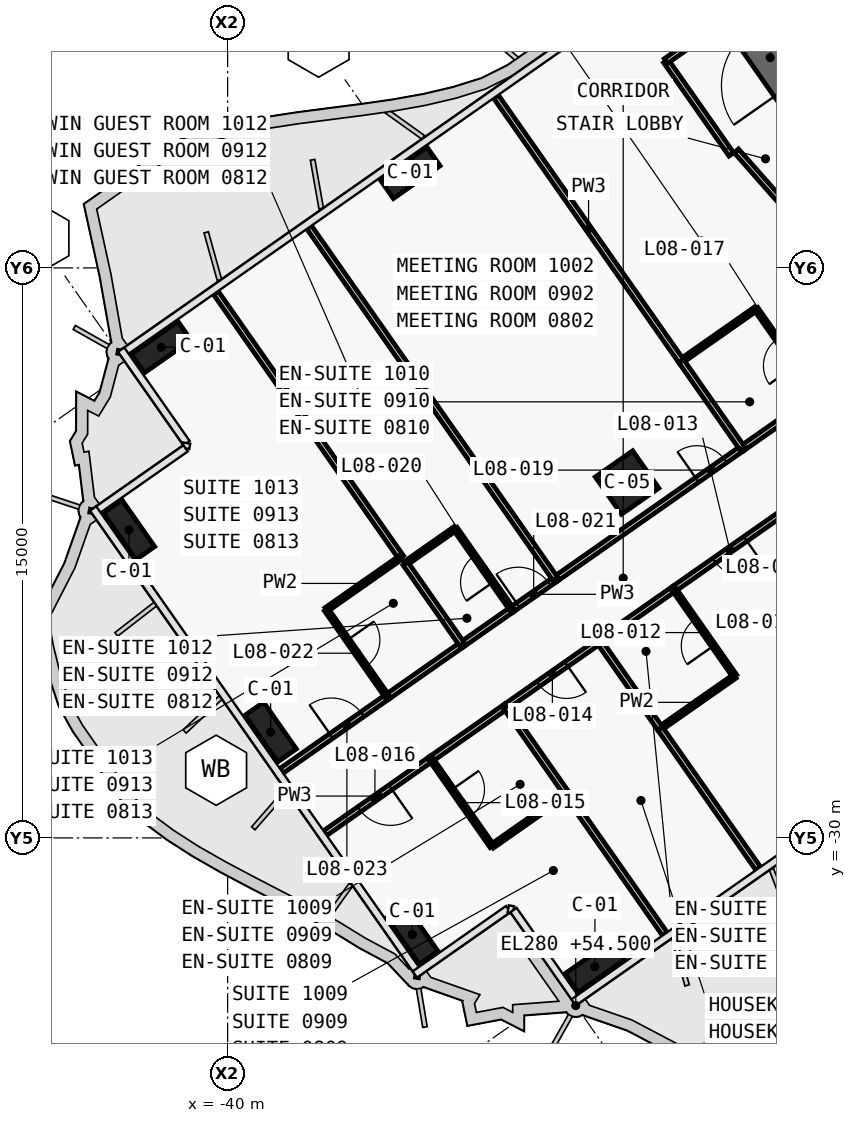
"""IFC4 building model, lengths in metres.
Left out: names, types, materials, properties, quantities, classifications, styles, units other than length and angle.
Written with IfcOpenShell. Run it as: python <this file> out.ifc"""

import sys

from ifc_helpers import new_model, si_unit, direction, frame, frame_2d, origin, origin_2d, place, context, subcontext, project, spatial, polyline, rectangle, outline, extrude, element, fill, save


model = new_model("IFC4")
c1 = context("Model", 3, precision=1e-05, world=origin(), true_north=direction((0.0, 1.0)))
c2 = subcontext(c1, "Body", "Model", "MODEL_VIEW")
j1 = project(units=[si_unit("LENGTHUNIT", "METRE"), si_unit("PLANEANGLEUNIT", "RADIAN")], contexts=[c1])
p1 = place(None, origin())
s1 = spatial("IfcSite", under=j1, at=p1, CompositionType="ELEMENT")
p2 = place(p1, origin())
s2 = spatial("IfcBuilding", under=s1, at=p2, CompositionType="ELEMENT")
p3 = place(p2, frame((0.0, 0.0, 54.5)))
s3 = spatial("IfcBuildingStorey", under=s2, at=p3, CompositionType="ELEMENT", Elevation=54.5)
p4 = place(p3, frame((-21.708, -15.2, 0.0), z_axis=(0.0, 0.0, 1.0), x_axis=(-0.573576324356, 0.819152122709, 0.0)))
e1 = element("IfcWall", 1, at=p4, inside=s3, PredefinedType="SHEAR", context=c2, shape_type="SweptSolid", body=[
    extrude(outline(polyline([(0.0, 0.5), (0.0, -0.5), (9.2, -0.5), (9.2, 0.5), (0.0, 0.5)])), origin(), (0.0, 0.0, 1.0), 3.6),
])
p5 = place(p4, frame((6.1, 0.0, 0.0)))
e2 = element("IfcOpeningElement", 2, at=p5, cuts=e1, PredefinedType="OPENING", context=c2, shape_type="SweptSolid", body=[
    extrude(rectangle(XDim=1.8, YDim=2.1, at=frame_2d((0.9, 1.05))), frame((0.0, 0.51, 0.0), z_axis=(0.0, -1.0, 0.0), x_axis=(1.0, 0.0, 0.0)), (0.0, 0.0, 1.0), 1.02),
])
p6 = place(p4, frame((1.9, 0.0, 0.0)))
e3 = element("IfcOpeningElement", 3, at=p6, cuts=e1, PredefinedType="OPENING", context=c2, shape_type="SweptSolid", body=[
    extrude(rectangle(XDim=1.8, YDim=2.1, at=frame_2d((0.9, 1.05))), frame((0.0, 0.51, 0.0), z_axis=(0.0, -1.0, 0.0), x_axis=(1.0, 0.0, 0.0)), (0.0, 0.0, 1.0), 1.02),
])
for number, where, z_axis, x_axis in (
    (4, (-30.336, -33.388, 0.0), (0.0, 0.0, 1.0), (-0.819, -0.574, 0.0)),
    (5, (-35.197, -12.498, 0.0), (0.0, 0.0, 1.0), (-0.819, -0.574, 0.0)),
    (6, (-41.75, -17.087, 0.0), (0.0, 0.0, 1.0), (-0.819, -0.574, 0.0)),
    (7, (-35.14, -32.541, 0.0), (0.0, 0.0, 1.0), (-0.574, 0.819, 0.0)),
    (8, (-38.869, -27.216, 0.0), (0.0, 0.0, 1.0), (-0.574, 0.819, 0.0)),
    (9, (-42.597, -21.892, 0.0), (0.0, 0.0, 1.0), (-0.574, 0.819, 0.0)),
):
    element("IfcColumn", number, at=place(p3, frame(where, z_axis=z_axis, x_axis=x_axis)), inside=s3, PredefinedType="COLUMN", context=c2, shape_type="SweptSolid", body=[
        extrude(rectangle(XDim=1.5, YDim=0.6, at=origin_2d()), origin(), (0.0, 0.0, 1.0), 3.6),
    ])
p7 = place(p3, frame((-29.49, -20.649, 0.0), z_axis=(0.0, 0.0, 1.0), x_axis=(-0.819152044289, -0.573576436351, 0.0)))
e10 = element("IfcColumn", 10, at=p7, inside=s3, PredefinedType="COLUMN", context=c2, shape_type="SweptSolid", body=[
    extrude(rectangle(XDim=1.2, YDim=1.2, at=origin_2d()), origin(), (0.0, 0.0, 1.0), 3.6),
])
p8 = place(p3, frame((-26.46, -19.748, 0.0), z_axis=(0.0, 0.0, 1.0), x_axis=(0.819179439794, 0.573537309527, 0.0)))
e11 = element("IfcWall", 11, at=p8, inside=s3, PredefinedType="PARTITIONING", context=c2, shape_type="SweptSolid", body=[
    extrude(rectangle(XDim=2.404, YDim=0.15, at=frame_2d((1.202, 0.0))), origin(), (0.0, 0.0, 1.0), 3.32),
])
p9 = place(p3, frame((-31.375, -23.19, 0.0), z_axis=(0.0, 0.0, 1.0), x_axis=(0.819165052243, 0.573557858619, 0.0)))
e12 = element("IfcWall", 12, at=p9, inside=s3, PredefinedType="PARTITIONING", context=c2, shape_type="SweptSolid", body=[
    extrude(rectangle(XDim=6.004, YDim=0.15, at=frame_2d((3.002, 0.0))), origin(), (0.0, 0.0, 1.0), 2.6),
])
p10 = place(p9, frame((4.552, 0.0, 0.0)))
e13 = element("IfcOpeningElement", 13, at=p10, cuts=e12, PredefinedType="OPENING", context=c2, shape_type="SweptSolid", body=[
    extrude(rectangle(XDim=0.9, YDim=2.1, at=frame_2d((0.45, 1.05))), frame((0.0, 0.085, 0.0), z_axis=(0.0, -1.0, 0.0), x_axis=(1.0, 0.0, 0.0)), (0.0, 0.0, 1.0), 0.17),
])
p11 = place(p3, frame((-32.521, -23.992, 0.0), z_axis=(0.0, 0.0, 1.0), x_axis=(0.819199220913, 0.573509055252, 0.0)))
e14 = element("IfcWall", 14, at=p11, inside=s3, PredefinedType="PARTITIONING", context=c2, shape_type="SweptSolid", body=[
    extrude(rectangle(XDim=1.403, YDim=0.15, at=frame_2d((0.702, 0.0))), origin(), (0.0, 0.0, 1.0), 3.32),
])
p12 = place(p11, frame((0.201, 0.0, 0.0)))
e15 = element("IfcOpeningElement", 15, at=p12, cuts=e14, PredefinedType="OPENING", context=c2, shape_type="SweptSolid", body=[
    extrude(rectangle(XDim=1.0, YDim=2.1, at=frame_2d((0.5, 1.05))), frame((0.0, 0.085, 0.0), z_axis=(0.0, -1.0, 0.0), x_axis=(1.0, 0.0, 0.0)), (0.0, 0.0, 1.0), 0.17),
])
p13 = place(p3, frame((-33.833, -24.91, 0.0), z_axis=(0.0, 0.0, 1.0), x_axis=(0.819189013667, 0.573523634986, 0.0)))
e16 = element("IfcWall", 16, at=p13, inside=s3, PredefinedType="PARTITIONING", context=c2, shape_type="SweptSolid", body=[
    extrude(rectangle(XDim=1.604, YDim=0.15, at=frame_2d((0.802, 0.0))), origin(), (0.0, 0.0, 1.0), 3.32),
])
p14 = place(p3, frame((-38.582, -28.236, 0.0), z_axis=(0.0, 0.0, 1.0), x_axis=(0.819154345195, 0.573573150303, 0.0)))
e17 = element("IfcWall", 17, at=p14, inside=s3, PredefinedType="PARTITIONING", context=c2, shape_type="SweptSolid", body=[
    extrude(rectangle(XDim=3.401, YDim=0.15, at=frame_2d((1.7, 0.0))), origin(), (0.0, 0.0, 1.0), 2.5),
])
p15 = place(p14, frame((1.6, 0.0, 0.0)))
e18 = element("IfcOpeningElement", 18, at=p15, cuts=e17, PredefinedType="OPENING", context=c2, shape_type="SweptSolid", body=[
    extrude(rectangle(XDim=1.0, YDim=2.1, at=frame_2d((0.5, 1.05))), frame((0.0, 0.085, 0.0), z_axis=(0.0, -1.0, 0.0), x_axis=(1.0, 0.0, 0.0)), (0.0, 0.0, 1.0), 0.17),
])
p16 = place(p3, frame((-35.798, -26.287, 0.0), z_axis=(0.0, 0.0, 1.0), x_axis=(0.819146032251, 0.573585022335, 0.0)))
e19 = element("IfcWall", 19, at=p16, inside=s3, PredefinedType="PARTITIONING", context=c2, shape_type="SweptSolid", body=[
    extrude(rectangle(XDim=2.404, YDim=0.15, at=frame_2d((1.202, 0.0))), origin(), (0.0, 0.0, 1.0), 3.32),
])
p17 = place(p3, frame((-25.31, -21.384, 0.0), z_axis=(0.0, 0.0, 1.0), x_axis=(-0.819145961204, -0.573585123798, 0.0)))
e20 = element("IfcWall", 20, at=p17, inside=s3, PredefinedType="PARTITIONING", context=c2, shape_type="SweptSolid", body=[
    extrude(rectangle(XDim=3.603, YDim=0.15, at=frame_2d((1.802, 0.0))), origin(), (0.0, 0.0, 1.0), 2.6),
])
p18 = place(p17, frame((1.302, 0.0, 0.0)))
e21 = element("IfcOpeningElement", 21, at=p18, cuts=e20, PredefinedType="OPENING", context=c2, shape_type="SweptSolid", body=[
    extrude(rectangle(XDim=1.0, YDim=2.1, at=frame_2d((0.5, 1.05))), frame((0.0, 0.085, 0.0), z_axis=(0.0, -1.0, 0.0), x_axis=(1.0, 0.0, 0.0)), (0.0, 0.0, 1.0), 0.17),
])
p19 = place(p3, frame((-28.259, -23.449, 0.0), z_axis=(0.0, 0.0, 1.0), x_axis=(-0.819146032251, -0.573585022335, 0.0)))
e22 = element("IfcWall", 22, at=p19, inside=s3, PredefinedType="PARTITIONING", context=c2, shape_type="SweptSolid", body=[
    extrude(rectangle(XDim=2.404, YDim=0.15, at=frame_2d((1.202, 0.0))), origin(), (0.0, 0.0, 1.0), 3.32),
])
p20 = place(p3, frame((-30.225, -24.826, 0.0), z_axis=(0.0, 0.0, 1.0), x_axis=(-0.819128818764, -0.573609604409, 0.0)))
e23 = element("IfcWall", 23, at=p20, inside=s3, PredefinedType="PARTITIONING", context=c2, shape_type="SweptSolid", body=[
    extrude(rectangle(XDim=3.004, YDim=0.15, at=frame_2d((1.502, 0.0))), origin(), (0.0, 0.0, 1.0), 3.32),
])
p21 = place(p20, frame((1.052, 0.0, 0.0)))
e24 = element("IfcOpeningElement", 24, at=p21, cuts=e23, PredefinedType="OPENING", context=c2, shape_type="SweptSolid", body=[
    extrude(rectangle(XDim=0.9, YDim=2.1, at=frame_2d((0.45, 1.05))), frame((0.0, 0.085, 0.0), z_axis=(0.0, -1.0, 0.0), x_axis=(1.0, 0.0, 0.0)), (0.0, 0.0, 1.0), 0.17),
])
p22 = place(p3, frame((-34.649, -27.924, 0.0), z_axis=(0.0, 0.0, 1.0), x_axis=(-0.819144234337, -0.573587589957, 0.0)))
e25 = element("IfcWall", 25, at=p22, inside=s3, PredefinedType="PARTITIONING", context=c2, shape_type="SweptSolid", body=[
    extrude(rectangle(XDim=3.401, YDim=0.15, at=frame_2d((1.701, 0.0))), origin(), (0.0, 0.0, 1.0), 2.5),
])
p23 = place(p22, frame((1.301, 0.0, 0.0)))
e26 = element("IfcOpeningElement", 26, at=p23, cuts=e25, PredefinedType="OPENING", context=c2, shape_type="SweptSolid", body=[
    extrude(rectangle(XDim=1.0, YDim=2.1, at=frame_2d((0.5, 1.05))), frame((0.0, 0.085, 0.0), z_axis=(0.0, -1.0, 0.0), x_axis=(1.0, 0.0, 0.0)), (0.0, 0.0, 1.0), 0.17),
])
p24 = place(p3, frame((-32.682, -26.546, 0.0), z_axis=(0.0, 0.0, 1.0), x_axis=(-0.819179439794, -0.573537309527, 0.0)))
e27 = element("IfcWall", 27, at=p24, inside=s3, PredefinedType="PARTITIONING", context=c2, shape_type="SweptSolid", body=[
    extrude(rectangle(XDim=2.404, YDim=0.15, at=frame_2d((1.202, 0.0))), origin(), (0.0, 0.0, 1.0), 3.32),
])
p25 = place(p3, frame((-26.746, -12.014, 0.0), z_axis=(0.0, 0.0, 1.0), x_axis=(-0.573560650686, 0.819163097304, 0.0)))
e28 = element("IfcWall", 28, at=p25, inside=s3, PredefinedType="PARTITIONING", context=c2, shape_type="SweptSolid", body=[
    extrude(rectangle(XDim=3.0, YDim=0.15, at=frame_2d((1.5, 0.0))), origin(), (0.0, 0.0, 1.0), 3.32),
])
p26 = place(p3, frame((-28.467, -9.556, 0.0), z_axis=(0.0, 0.0, 1.0), x_axis=(0.819109000826, 0.573637903879, 0.0)))
e29 = element("IfcWall", 29, at=p26, inside=s3, PredefinedType="PARTITIONING", context=c2, shape_type="SweptSolid", body=[
    extrude(rectangle(XDim=1.68, YDim=0.15, at=frame_2d((0.84, 0.0))), origin(), (0.0, 0.0, 1.0), 3.32),
])
p27 = place(p3, frame((-22.284, -16.827, 0.0), z_axis=(0.0, 0.0, 1.0), x_axis=(-0.661545117561, 0.749905365651, 0.0)))
e30 = element("IfcWall", 30, at=p27, inside=s3, PredefinedType="PARTITIONING", context=c2, shape_type="SweptSolid", body=[
    extrude(rectangle(XDim=6.543, YDim=0.15, at=frame_2d((3.271, 0.0))), origin(), (0.0, 0.0, 1.0), 2.6),
])
p28 = place(p3, frame((-24.492, -18.37, 0.0), z_axis=(0.0, 0.0, 1.0), x_axis=(-0.573550118428, 0.819170471667, 0.0)))
e31 = element("IfcWall", 31, at=p28, inside=s3, PredefinedType="PARTITIONING", context=c2, shape_type="SweptSolid", body=[
    extrude(rectangle(XDim=2.8, YDim=0.12, at=frame_2d((1.4, 0.0))), origin(), (0.0, 0.0, 1.0), 2.6),
])
p29 = place(p28, frame((0.975, 0.0, 0.0)))
e32 = element("IfcOpeningElement", 32, at=p29, cuts=e31, PredefinedType="OPENING", context=c2, shape_type="SweptSolid", body=[
    extrude(rectangle(XDim=0.85, YDim=2.05, at=frame_2d((0.425, 1.025))), frame((0.0, 0.07, 0.0), z_axis=(0.0, -1.0, 0.0), x_axis=(1.0, 0.0, 0.0)), (0.0, 0.0, 1.0), 0.14),
])
p30 = place(p3, frame((-26.099, -16.076, 0.0), z_axis=(0.0, 0.0, 1.0), x_axis=(-0.819155442668, -0.573571582932, 0.0)))
e33 = element("IfcWall", 33, at=p30, inside=s3, PredefinedType="PARTITIONING", context=c2, shape_type="SweptSolid", body=[
    extrude(rectangle(XDim=2.4, YDim=0.12, at=frame_2d((1.2, 0.0))), origin(), (0.0, 0.0, 1.0), 3.32),
])
p31 = place(p3, frame((-28.065, -17.453, 0.0), z_axis=(0.0, 0.0, 1.0), x_axis=(-0.573593433868, 0.819140142237, 0.0)))
e34 = element("IfcWall", 34, at=p31, inside=s3, PredefinedType="PARTITIONING", context=c2, shape_type="SweptSolid", body=[
    extrude(rectangle(XDim=8.499, YDim=0.15, at=frame_2d((4.25, 0.0))), origin(), (0.0, 0.0, 1.0), 2.6),
])
p32 = place(p3, frame((-26.458, -19.747, 0.0), z_axis=(0.0, 0.0, 1.0), x_axis=(-0.573550118428, 0.819170471667, 0.0)))
e35 = element("IfcWall", 35, at=p32, inside=s3, PredefinedType="PARTITIONING", context=c2, shape_type="SweptSolid", body=[
    extrude(rectangle(XDim=2.8, YDim=0.15, at=frame_2d((1.4, 0.0))), origin(), (0.0, 0.0, 1.0), 2.6),
])
p33 = place(p3, frame((-31.373, -23.189, 0.0), z_axis=(0.0, 0.0, 1.0), x_axis=(-0.573571089604, 0.819155788095, 0.0)))
e36 = element("IfcWall", 36, at=p33, inside=s3, PredefinedType="PARTITIONING", context=c2, shape_type="SweptSolid", body=[
    extrude(rectangle(XDim=11.3, YDim=0.15, at=frame_2d((5.65, 0.0))), origin(), (0.0, 0.0, 1.0), 2.5),
])
p34 = place(p3, frame((-32.519, -23.991, 0.0), z_axis=(0.0, 0.0, 1.0), x_axis=(-0.573537965655, 0.819178980414, 0.0)))
e37 = element("IfcWall", 37, at=p34, inside=s3, PredefinedType="PARTITIONING", context=c2, shape_type="SweptSolid", body=[
    extrude(rectangle(XDim=2.6, YDim=0.12, at=frame_2d((1.3, 0.0))), origin(), (0.0, 0.0, 1.0), 2.6),
])
p35 = place(p34, frame((0.875, 0.0, 0.0)))
e38 = element("IfcOpeningElement", 38, at=p35, cuts=e37, PredefinedType="OPENING", context=c2, shape_type="SweptSolid", body=[
    extrude(rectangle(XDim=0.85, YDim=2.05, at=frame_2d((0.425, 1.025))), frame((0.0, 0.07, 0.0), z_axis=(0.0, -1.0, 0.0), x_axis=(1.0, 0.0, 0.0)), (0.0, 0.0, 1.0), 0.14),
])
p36 = place(p3, frame((-34.012, -21.861, 0.0), z_axis=(0.0, 0.0, 1.0), x_axis=(-0.81918174131, -0.573534022273, 0.0)))
e39 = element("IfcWall", 39, at=p36, inside=s3, PredefinedType="PARTITIONING", context=c2, shape_type="SweptSolid", body=[
    extrude(rectangle(XDim=1.6, YDim=0.12, at=frame_2d((0.8, 0.0))), origin(), (0.0, 0.0, 1.0), 3.32),
])
p37 = place(p3, frame((-35.436, -22.617, 0.0), z_axis=(0.0, 0.0, 1.0), x_axis=(-0.57356256513, 0.819161756848, 0.0)))
e40 = element("IfcWall", 40, at=p37, inside=s3, PredefinedType="PARTITIONING", context=c2, shape_type="SweptSolid", body=[
    extrude(rectangle(XDim=8.501, YDim=0.15, at=frame_2d((4.25, 0.0))), origin(), (0.0, 0.0, 1.0), 2.5),
])
p38 = place(p3, frame((-33.831, -24.909, 0.0), z_axis=(0.0, 0.0, 1.0), x_axis=(-0.573537965655, 0.819178980414, 0.0)))
e41 = element("IfcWall", 41, at=p38, inside=s3, PredefinedType="PARTITIONING", context=c2, shape_type="SweptSolid", body=[
    extrude(rectangle(XDim=2.6, YDim=0.15, at=frame_2d((1.3, 0.0))), origin(), (0.0, 0.0, 1.0), 2.6),
])
p39 = place(p3, frame((-35.438, -22.615, 0.0), z_axis=(0.0, 0.0, 1.0), x_axis=(-0.819155442668, -0.573571582932, 0.0)))
e42 = element("IfcWall", 42, at=p39, inside=s3, PredefinedType="PARTITIONING", context=c2, shape_type="SweptSolid", body=[
    extrude(rectangle(XDim=2.4, YDim=0.12, at=frame_2d((1.2, 0.0))), origin(), (0.0, 0.0, 1.0), 3.32),
])
p40 = place(p3, frame((-37.404, -23.993, 0.0), z_axis=(0.0, 0.0, 1.0), x_axis=(0.573550118428, -0.819170471667, 0.0)))
e43 = element("IfcWall", 43, at=p40, inside=s3, PredefinedType="PARTITIONING", context=c2, shape_type="SweptSolid", body=[
    extrude(rectangle(XDim=2.8, YDim=0.12, at=frame_2d((1.4, 0.0))), origin(), (0.0, 0.0, 1.0), 2.6),
])
p41 = place(p40, frame((0.975, 0.0, 0.0)))
e44 = element("IfcOpeningElement", 44, at=p41, cuts=e43, PredefinedType="OPENING", context=c2, shape_type="SweptSolid", body=[
    extrude(rectangle(XDim=0.85, YDim=2.05, at=frame_2d((0.425, 1.025))), frame((0.0, 0.07, 0.0), z_axis=(0.0, -1.0, 0.0), x_axis=(1.0, 0.0, 0.0)), (0.0, 0.0, 1.0), 0.14),
])
p42 = place(p3, frame((-28.62, -27.121, 0.0), z_axis=(0.0, 0.0, 1.0), x_axis=(0.819188907105, 0.573523787192, 0.0)))
e45 = element("IfcWall", 45, at=p42, inside=s3, PredefinedType="PARTITIONING", context=c2, shape_type="SweptSolid", body=[
    extrude(rectangle(XDim=2.4, YDim=0.12, at=frame_2d((1.2, 0.0))), origin(), (0.0, 0.0, 1.0), 3.32),
])
p43 = place(p3, frame((-26.653, -25.743, 0.0), z_axis=(0.0, 0.0, 1.0), x_axis=(-0.573608623498, 0.819129505664, 0.0)))
e46 = element("IfcWall", 46, at=p43, inside=s3, PredefinedType="PARTITIONING", context=c2, shape_type="SweptSolid", body=[
    extrude(rectangle(XDim=2.8, YDim=0.12, at=frame_2d((1.4, 0.0))), origin(), (0.0, 0.0, 1.0), 3.32),
])
p44 = place(p43, frame((0.975, 0.0, 0.0)))
e47 = element("IfcOpeningElement", 47, at=p44, cuts=e46, PredefinedType="OPENING", context=c2, shape_type="SweptSolid", body=[
    extrude(rectangle(XDim=0.85, YDim=2.05, at=frame_2d((0.425, 1.025))), frame((0.0, 0.07, 0.0), z_axis=(0.0, -1.0, 0.0), x_axis=(1.0, 0.0, 0.0)), (0.0, 0.0, 1.0), 0.14),
])
p45 = place(p3, frame((-26.039, -30.807, 0.0), z_axis=(0.0, 0.0, 1.0), x_axis=(-0.573589807488, 0.819142681555, 0.0)))
e48 = element("IfcWall", 48, at=p45, inside=s3, PredefinedType="PARTITIONING", context=c2, shape_type="SweptSolid", body=[
    extrude(rectangle(XDim=4.499, YDim=0.15, at=frame_2d((2.25, 0.0))), origin(), (0.0, 0.0, 1.0), 2.5),
])
p46 = place(p3, frame((-28.62, -27.121, 0.0), z_axis=(0.0, 0.0, 1.0), x_axis=(-0.573608623498, 0.819129505664, 0.0)))
e49 = element("IfcWall", 49, at=p46, inside=s3, PredefinedType="PARTITIONING", context=c2, shape_type="SweptSolid", body=[
    extrude(rectangle(XDim=2.8, YDim=0.15, at=frame_2d((1.4, 0.0))), origin(), (0.0, 0.0, 1.0), 3.32),
])
p47 = place(p3, frame((-28.497, -32.528, 0.0), z_axis=(0.0, 0.0, 1.0), x_axis=(-0.573556991349, 0.819165659482, 0.0)))
e50 = element("IfcWall", 50, at=p47, inside=s3, PredefinedType="PARTITIONING", context=c2, shape_type="SweptSolid", body=[
    extrude(rectangle(XDim=4.501, YDim=0.15, at=frame_2d((2.25, 0.0))), origin(), (0.0, 0.0, 1.0), 2.5),
])
p48 = place(p3, frame((-31.076, -28.843, 0.0), z_axis=(0.0, 0.0, 1.0), x_axis=(-0.573555899632, 0.819166423871, 0.0)))
e51 = element("IfcWall", 51, at=p48, inside=s3, PredefinedType="PARTITIONING", context=c2, shape_type="SweptSolid", body=[
    extrude(rectangle(XDim=2.802, YDim=0.15, at=frame_2d((1.401, 0.0))), origin(), (0.0, 0.0, 1.0), 3.32),
])
p49 = place(p3, frame((-34.65, -27.925, 0.0), z_axis=(0.0, 0.0, 1.0), x_axis=(0.573550118428, -0.819170471667, 0.0)))
e52 = element("IfcWall", 52, at=p49, inside=s3, PredefinedType="PARTITIONING", context=c2, shape_type="SweptSolid", body=[
    extrude(rectangle(XDim=2.8, YDim=0.12, at=frame_2d((1.4, 0.0))), origin(), (0.0, 0.0, 1.0), 3.32),
])
p50 = place(p49, frame((0.975, 0.0, 0.0)))
e53 = element("IfcOpeningElement", 53, at=p50, cuts=e52, PredefinedType="OPENING", context=c2, shape_type="SweptSolid", body=[
    extrude(rectangle(XDim=0.85, YDim=2.05, at=frame_2d((0.425, 1.025))), frame((0.0, 0.07, 0.0), z_axis=(0.0, -1.0, 0.0), x_axis=(1.0, 0.0, 0.0)), (0.0, 0.0, 1.0), 0.14),
])
p51 = place(p3, frame((-33.043, -30.219, 0.0), z_axis=(0.0, 0.0, 1.0), x_axis=(0.819107643868, 0.573639841501, 0.0)))
e54 = element("IfcWall", 54, at=p51, inside=s3, PredefinedType="PARTITIONING", context=c2, shape_type="SweptSolid", body=[
    extrude(rectangle(XDim=2.4, YDim=0.12, at=frame_2d((1.2, 0.0))), origin(), (0.0, 0.0, 1.0), 3.32),
])
p52 = place(p5, origin())
e55 = element("IfcDoor", 55, at=p52, inside=s3, OperationType="DOUBLE_DOOR_SINGLE_SWING", PredefinedType="DOOR", context=c2, shape_type="SweptSolid", body=[
    extrude(rectangle(XDim=1.8, YDim=2.1, at=frame_2d((0.9, 1.05))), frame((0.0, 0.025, 0.0), z_axis=(0.0, -1.0, 0.0), x_axis=(1.0, 0.0, 0.0)), (0.0, 0.0, 1.0), 0.05),
])
fill(e2, e55)
p53 = place(p44, origin())
e56 = element("IfcDoor", 56, at=p53, inside=s3, OperationType="SINGLE_SWING_RIGHT", PredefinedType="DOOR", context=c2, shape_type="SweptSolid", body=[
    extrude(rectangle(XDim=0.85, YDim=2.05, at=frame_2d((0.425, 1.025))), frame((0.0, 0.025, 0.0), z_axis=(0.0, -1.0, 0.0), x_axis=(1.0, 0.0, 0.0)), (0.0, 0.0, 1.0), 0.05),
])
fill(e47, e56)
p54 = place(p18, origin())
e57 = element("IfcDoor", 57, at=p54, inside=s3, OperationType="SINGLE_SWING_LEFT", PredefinedType="DOOR", context=c2, shape_type="SweptSolid", body=[
    extrude(rectangle(XDim=1.0, YDim=2.1, at=frame_2d((0.5, 1.05))), frame((0.0, 0.025, 0.0), z_axis=(0.0, -1.0, 0.0), x_axis=(1.0, 0.0, 0.0)), (0.0, 0.0, 1.0), 0.05),
])
fill(e21, e57)
p55 = place(p21, origin())
e58 = element("IfcDoor", 58, at=p55, inside=s3, OperationType="SINGLE_SWING_LEFT", PredefinedType="DOOR", context=c2, shape_type="SweptSolid", body=[
    extrude(rectangle(XDim=0.9, YDim=2.1, at=frame_2d((0.45, 1.05))), frame((0.0, 0.025, 0.0), z_axis=(0.0, -1.0, 0.0), x_axis=(1.0, 0.0, 0.0)), (0.0, 0.0, 1.0), 0.05),
])
fill(e24, e58)
p56 = place(p50, origin())
e59 = element("IfcDoor", 59, at=p56, inside=s3, OperationType="SINGLE_SWING_LEFT", PredefinedType="DOOR", context=c2, shape_type="SweptSolid", body=[
    extrude(rectangle(XDim=0.85, YDim=2.05, at=frame_2d((0.425, 1.025))), frame((0.0, 0.025, 0.0), z_axis=(0.0, -1.0, 0.0), x_axis=(1.0, 0.0, 0.0)), (0.0, 0.0, 1.0), 0.05),
])
fill(e53, e59)
p57 = place(p23, origin())
e60 = element("IfcDoor", 60, at=p57, inside=s3, OperationType="SINGLE_SWING_RIGHT", PredefinedType="DOOR", context=c2, shape_type="SweptSolid", body=[
    extrude(rectangle(XDim=1.0, YDim=2.1, at=frame_2d((0.5, 1.05))), frame((0.0, 0.025, 0.0), z_axis=(0.0, -1.0, 0.0), x_axis=(1.0, 0.0, 0.0)), (0.0, 0.0, 1.0), 0.05),
])
fill(e26, e60)
p58 = place(p10, origin())
e61 = element("IfcDoor", 61, at=p58, inside=s3, OperationType="SINGLE_SWING_LEFT", PredefinedType="DOOR", context=c2, shape_type="SweptSolid", body=[
    extrude(rectangle(XDim=0.9, YDim=2.1, at=frame_2d((0.45, 1.05))), frame((0.0, 0.025, 0.0), z_axis=(0.0, -1.0, 0.0), x_axis=(1.0, 0.0, 0.0)), (0.0, 0.0, 1.0), 0.05),
])
fill(e13, e61)
p59 = place(p35, origin())
e62 = element("IfcDoor", 62, at=p59, inside=s3, OperationType="SINGLE_SWING_LEFT", PredefinedType="DOOR", context=c2, shape_type="SweptSolid", body=[
    extrude(rectangle(XDim=0.85, YDim=2.05, at=frame_2d((0.425, 1.025))), frame((0.0, 0.025, 0.0), z_axis=(0.0, -1.0, 0.0), x_axis=(1.0, 0.0, 0.0)), (0.0, 0.0, 1.0), 0.05),
])
fill(e38, e62)
p60 = place(p12, origin())
e63 = element("IfcDoor", 63, at=p60, inside=s3, OperationType="SINGLE_SWING_RIGHT", PredefinedType="DOOR", context=c2, shape_type="SweptSolid", body=[
    extrude(rectangle(XDim=1.0, YDim=2.1, at=frame_2d((0.5, 1.05))), frame((0.0, 0.025, 0.0), z_axis=(0.0, -1.0, 0.0), x_axis=(1.0, 0.0, 0.0)), (0.0, 0.0, 1.0), 0.05),
])
fill(e15, e63)
p61 = place(p41, origin())
e64 = element("IfcDoor", 64, at=p61, inside=s3, OperationType="SINGLE_SWING_RIGHT", PredefinedType="DOOR", context=c2, shape_type="SweptSolid", body=[
    extrude(rectangle(XDim=0.85, YDim=2.05, at=frame_2d((0.425, 1.025))), frame((0.0, 0.025, 0.0), z_axis=(0.0, -1.0, 0.0), x_axis=(1.0, 0.0, 0.0)), (0.0, 0.0, 1.0), 0.05),
])
fill(e44, e64)
p62 = place(p15, origin())
e65 = element("IfcDoor", 65, at=p62, inside=s3, OperationType="SINGLE_SWING_LEFT", PredefinedType="DOOR", context=c2, shape_type="SweptSolid", body=[
    extrude(rectangle(XDim=1.0, YDim=2.1, at=frame_2d((0.5, 1.05))), frame((0.0, 0.025, 0.0), z_axis=(0.0, -1.0, 0.0), x_axis=(1.0, 0.0, 0.0)), (0.0, 0.0, 1.0), 0.05),
])
fill(e18, e65)
save(model, sys.argv[1])
